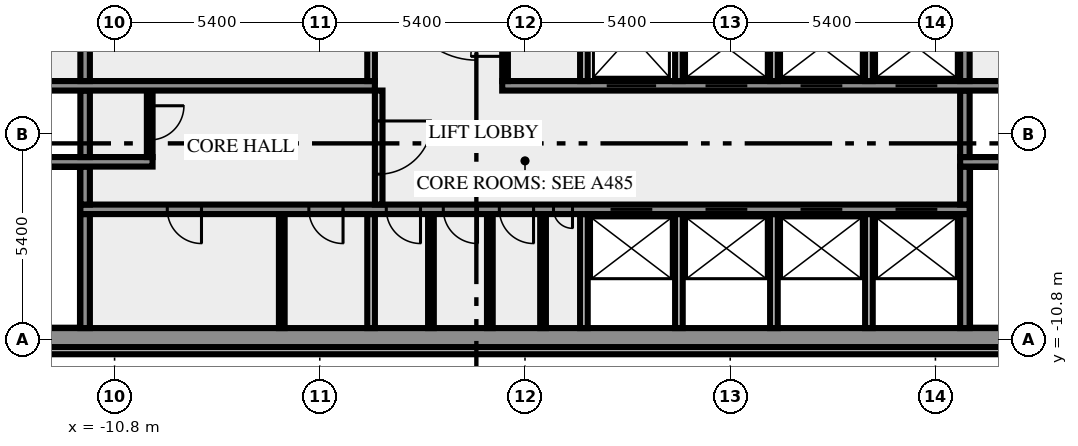
"""IFC4 building model, lengths in metres.
Left out: names, types, materials, properties, quantities, classifications, styles, units other than length and angle.
Written with IfcOpenShell. Run it as: python <this file> out.ifc"""

import sys

from ifc_helpers import new_model, si_unit, direction, frame, frame_2d, origin, place, context, subcontext, project, spatial, rectangle, extrude, element, fill, save


model = new_model("IFC4")
c1 = context("Model", 3, precision=1e-05, world=origin(), true_north=direction((0.0, 1.0)))
c2 = subcontext(c1, "Body", "Model", "MODEL_VIEW")
j1 = project(units=[si_unit("LENGTHUNIT", "METRE"), si_unit("PLANEANGLEUNIT", "RADIAN")], contexts=[c1])
p1 = place(None, origin())
s1 = spatial("IfcSite", under=j1, at=p1, CompositionType="ELEMENT")
p2 = place(p1, origin())
s2 = spatial("IfcBuilding", under=s1, at=p2, CompositionType="ELEMENT")
p3 = place(p2, frame((0.0, 0.0, 172.0)))
s3 = spatial("IfcBuildingStorey", under=s2, at=p3, CompositionType="ELEMENT", Elevation=172.0)
p4 = place(p3, frame((-17.444, -11.088, 0.0), z_axis=(0.0, 0.0, 1.0), x_axis=(1.0, 0.0, 0.0)))
e1 = element("IfcWall", 1, at=p4, inside=s3, PredefinedType="SOLIDWALL", context=c2, shape_type="SweptSolid", body=[
    extrude(rectangle(XDim=34.888, YDim=0.2, at=frame_2d((17.444, 0.0))), origin(), (0.0, 0.0, 1.0), 3.65),
])
p5 = place(p3, frame((-20.0, -10.75, 0.0), z_axis=(0.0, 0.0, 1.0), x_axis=(1.0, 0.0, 0.0)))
e2 = element("IfcWall", 2, at=p5, inside=s3, PredefinedType="SHEAR", context=c2, shape_type="SweptSolid", body=[
    extrude(rectangle(XDim=40.0, YDim=0.5, at=frame_2d((20.0, 0.0))), origin(), (0.0, 0.0, 1.0), 3.65),
])
p6 = place(p5, frame((0.8, 0.0, 1.0)))
e3 = element("IfcOpeningElement", 3, at=p6, cuts=e2, PredefinedType="OPENING", context=c2, shape_type="SweptSolid", body=[
    extrude(rectangle(XDim=1.2, YDim=1.2, at=frame_2d((0.6, 0.6))), frame((0.0, 0.26, 0.0), z_axis=(0.0, -1.0, 0.0), x_axis=(1.0, 0.0, 0.0)), (0.0, 0.0, 1.0), 0.52),
])
p7 = place(p5, frame((38.0, 0.0, 1.0)))
e4 = element("IfcOpeningElement", 4, at=p7, cuts=e2, PredefinedType="OPENING", context=c2, shape_type="SweptSolid", body=[
    extrude(rectangle(XDim=1.2, YDim=1.2, at=frame_2d((0.6, 0.6))), frame((0.0, 0.26, 0.0), z_axis=(0.0, -1.0, 0.0), x_axis=(1.0, 0.0, 0.0)), (0.0, 0.0, 1.0), 0.52),
])
p8 = place(p3, frame((-11.575, -10.5, 0.0), z_axis=(0.0, 0.0, 1.0), x_axis=(0.0, 1.0, 0.0)))
e5 = element("IfcWall", 5, at=p8, inside=s3, PredefinedType="SHEAR", context=c2, shape_type="SweptSolid", body=[
    extrude(rectangle(XDim=3.0, YDim=0.25, at=frame_2d((1.5, 0.0))), origin(), (0.0, 0.0, 1.0), 3.65),
])
p9 = place(p3, frame((-6.4, -10.5, 0.0), z_axis=(0.0, 0.0, 1.0), x_axis=(0.0, 1.0, 0.0)))
e6 = element("IfcWall", 6, at=p9, inside=s3, PredefinedType="PARTITIONING", context=c2, shape_type="SweptSolid", body=[
    extrude(rectangle(XDim=3.0, YDim=0.15, at=frame_2d((1.5, 0.0))), origin(), (0.0, 0.0, 1.0), 3.65),
])
p10 = place(p3, frame((-4.05, -10.5, 0.0), z_axis=(0.0, 0.0, 1.0), x_axis=(0.0, 1.0, 0.0)))
e7 = element("IfcWall", 7, at=p10, inside=s3, PredefinedType="SOLIDWALL", context=c2, shape_type="SweptSolid", body=[
    extrude(rectangle(XDim=3.0, YDim=0.2, at=frame_2d((1.5, 0.0))), origin(), (0.0, 0.0, 1.0), 3.65),
])
for number, where, z_axis, x_axis in (
    (8, (-2.475, -10.5, 0.0), (0.0, 0.0, 1.0), (0.0, 1.0, 0.0)),
    (9, (-0.925, -10.5, 0.0), (0.0, 0.0, 1.0), (0.0, 1.0, 0.0)),
    (10, (0.475, -10.5, 0.0), (0.0, 0.0, 1.0), (0.0, 1.0, 0.0)),
):
    element("IfcWall", number, at=place(p3, frame(where, z_axis=z_axis, x_axis=x_axis)), inside=s3, PredefinedType="PARTITIONING", context=c2, shape_type="SweptSolid", body=[
        extrude(rectangle(XDim=3.0, YDim=0.15, at=frame_2d((1.5, 0.0))), origin(), (0.0, 0.0, 1.0), 3.65),
    ])
for number, where, z_axis, x_axis in (
    (11, (1.55, -10.5, 0.0), (0.0, 0.0, 1.0), (0.0, 1.0, 0.0)),
    (12, (4.05, -10.5, 0.0), (0.0, 0.0, 1.0), (0.0, 1.0, 0.0)),
    (13, (6.55, -10.5, 0.0), (0.0, 0.0, 1.0), (0.0, 1.0, 0.0)),
    (14, (9.05, -10.5, 0.0), (0.0, 0.0, 1.0), (0.0, 1.0, 0.0)),
):
    element("IfcWall", number, at=place(p3, frame(where, z_axis=z_axis, x_axis=x_axis)), inside=s3, PredefinedType="SOLIDWALL", context=c2, shape_type="SweptSolid", body=[
        extrude(rectangle(XDim=3.0, YDim=0.2, at=frame_2d((1.5, 0.0))), origin(), (0.0, 0.0, 1.0), 3.65),
    ])
p11 = place(p3, frame((11.575, -10.5, 0.0), z_axis=(0.0, 0.0, 1.0), x_axis=(0.0, 1.0, 0.0)))
e15 = element("IfcWall", 15, at=p11, inside=s3, PredefinedType="SHEAR", context=c2, shape_type="SweptSolid", body=[
    extrude(rectangle(XDim=3.0, YDim=0.25, at=frame_2d((1.5, 0.0))), origin(), (0.0, 0.0, 1.0), 3.65),
])
p12 = place(p3, frame((11.7, -7.375, 0.0), z_axis=(0.0, 0.0, 1.0), x_axis=(-1.0, 0.0, 0.0)))
e16 = element("IfcWall", 16, at=p12, inside=s3, PredefinedType="SHEAR", context=c2, shape_type="SweptSolid", body=[
    extrude(rectangle(XDim=23.4, YDim=0.25, at=frame_2d((11.7, 0.0))), origin(), (0.0, 0.0, 1.0), 3.65),
])
p13 = place(p12, frame((20.213, 0.0, 0.0)))
e17 = element("IfcOpeningElement", 17, at=p13, cuts=e16, PredefinedType="OPENING", context=c2, shape_type="SweptSolid", body=[
    extrude(rectangle(XDim=0.9, YDim=2.1, at=frame_2d((0.45, 1.05))), frame((0.0, 0.135, 0.0), z_axis=(0.0, -1.0, 0.0), x_axis=(1.0, 0.0, 0.0)), (0.0, 0.0, 1.0), 0.27),
])
p14 = place(p12, frame((16.488, 0.0, 0.0)))
e18 = element("IfcOpeningElement", 18, at=p14, cuts=e16, PredefinedType="OPENING", context=c2, shape_type="SweptSolid", body=[
    extrude(rectangle(XDim=0.9, YDim=2.1, at=frame_2d((0.45, 1.05))), frame((0.0, 0.135, 0.0), z_axis=(0.0, -1.0, 0.0), x_axis=(1.0, 0.0, 0.0)), (0.0, 0.0, 1.0), 0.27),
])
p15 = place(p12, frame((14.45, 0.0, 0.0)))
e19 = element("IfcOpeningElement", 19, at=p15, cuts=e16, PredefinedType="OPENING", context=c2, shape_type="SweptSolid", body=[
    extrude(rectangle(XDim=0.9, YDim=2.1, at=frame_2d((0.45, 1.05))), frame((0.0, 0.135, 0.0), z_axis=(0.0, -1.0, 0.0), x_axis=(1.0, 0.0, 0.0)), (0.0, 0.0, 1.0), 0.27),
])
p16 = place(p12, frame((12.95, 0.0, 0.0)))
e20 = element("IfcOpeningElement", 20, at=p16, cuts=e16, PredefinedType="OPENING", context=c2, shape_type="SweptSolid", body=[
    extrude(rectangle(XDim=0.9, YDim=2.1, at=frame_2d((0.45, 1.05))), frame((0.0, 0.135, 0.0), z_axis=(0.0, -1.0, 0.0), x_axis=(1.0, 0.0, 0.0)), (0.0, 0.0, 1.0), 0.27),
])
p17 = place(p12, frame((11.475, 0.0, 0.0)))
e21 = element("IfcOpeningElement", 21, at=p17, cuts=e16, PredefinedType="OPENING", context=c2, shape_type="SweptSolid", body=[
    extrude(rectangle(XDim=0.9, YDim=2.1, at=frame_2d((0.45, 1.05))), frame((0.0, 0.135, 0.0), z_axis=(0.0, -1.0, 0.0), x_axis=(1.0, 0.0, 0.0)), (0.0, 0.0, 1.0), 0.27),
])
p18 = place(p12, frame((10.45, 0.0, 0.0)))
e22 = element("IfcOpeningElement", 22, at=p18, cuts=e16, PredefinedType="OPENING", context=c2, shape_type="SweptSolid", body=[
    extrude(rectangle(XDim=0.5, YDim=2.1, at=frame_2d((0.25, 1.05))), frame((0.0, 0.135, 0.0), z_axis=(0.0, -1.0, 0.0), x_axis=(1.0, 0.0, 0.0)), (0.0, 0.0, 1.0), 0.27),
])
p19 = place(p12, frame((8.35, 0.0, 0.0)))
e23 = element("IfcOpeningElement", 23, at=p19, cuts=e16, PredefinedType="OPENING", context=c2, shape_type="SweptSolid", body=[
    extrude(rectangle(XDim=1.1, YDim=2.1, at=frame_2d((0.55, 1.05))), frame((0.0, 0.135, 0.0), z_axis=(0.0, -1.0, 0.0), x_axis=(1.0, 0.0, 0.0)), (0.0, 0.0, 1.0), 0.27),
])
p20 = place(p12, frame((5.85, 0.0, 0.0)))
e24 = element("IfcOpeningElement", 24, at=p20, cuts=e16, PredefinedType="OPENING", context=c2, shape_type="SweptSolid", body=[
    extrude(rectangle(XDim=1.1, YDim=2.1, at=frame_2d((0.55, 1.05))), frame((0.0, 0.135, 0.0), z_axis=(0.0, -1.0, 0.0), x_axis=(1.0, 0.0, 0.0)), (0.0, 0.0, 1.0), 0.27),
])
p21 = place(p12, frame((3.35, 0.0, 0.0)))
e25 = element("IfcOpeningElement", 25, at=p21, cuts=e16, PredefinedType="OPENING", context=c2, shape_type="SweptSolid", body=[
    extrude(rectangle(XDim=1.1, YDim=2.1, at=frame_2d((0.55, 1.05))), frame((0.0, 0.135, 0.0), z_axis=(0.0, -1.0, 0.0), x_axis=(1.0, 0.0, 0.0)), (0.0, 0.0, 1.0), 0.27),
])
p22 = place(p12, frame((0.85, 0.0, 0.0)))
e26 = element("IfcOpeningElement", 26, at=p22, cuts=e16, PredefinedType="OPENING", context=c2, shape_type="SweptSolid", body=[
    extrude(rectangle(XDim=1.1, YDim=2.1, at=frame_2d((0.55, 1.05))), frame((0.0, 0.135, 0.0), z_axis=(0.0, -1.0, 0.0), x_axis=(1.0, 0.0, 0.0)), (0.0, 0.0, 1.0), 0.27),
])
p23 = place(p3, frame((-11.575, -7.25, 0.0), z_axis=(0.0, 0.0, 1.0), x_axis=(0.0, 1.0, 0.0)))
e27 = element("IfcWall", 27, at=p23, inside=s3, PredefinedType="SHEAR", context=c2, shape_type="SweptSolid", body=[
    extrude(rectangle(XDim=1.0, YDim=0.25, at=frame_2d((0.5, 0.0))), origin(), (0.0, 0.0, 1.0), 3.65),
])
p24 = place(p3, frame((-3.85, -4.25, 0.0), z_axis=(0.0, 0.0, 1.0), x_axis=(0.0, -1.0, 0.0)))
e28 = element("IfcWall", 28, at=p24, inside=s3, PredefinedType="SOLIDWALL", context=c2, shape_type="SweptSolid", body=[
    extrude(rectangle(XDim=3.0, YDim=0.2, at=frame_2d((1.5, 0.0))), origin(), (0.0, 0.0, 1.0), 3.65),
])
p25 = place(p24, frame((0.8, 0.0, 0.0)))
e29 = element("IfcOpeningElement", 29, at=p25, cuts=e28, PredefinedType="OPENING", context=c2, shape_type="SweptSolid", body=[
    extrude(rectangle(XDim=1.4, YDim=2.1, at=frame_2d((0.7, 1.05))), frame((0.0, 0.11, 0.0), z_axis=(0.0, -1.0, 0.0), x_axis=(1.0, 0.0, 0.0)), (0.0, 0.0, 1.0), 0.22),
])
p26 = place(p3, frame((11.575, -7.25, 0.0), z_axis=(0.0, 0.0, 1.0), x_axis=(0.0, 1.0, 0.0)))
e30 = element("IfcWall", 30, at=p26, inside=s3, PredefinedType="SHEAR", context=c2, shape_type="SweptSolid", body=[
    extrude(rectangle(XDim=1.0, YDim=0.25, at=frame_2d((0.5, 0.0))), origin(), (0.0, 0.0, 1.0), 3.65),
])
p27 = place(p3, frame((-9.8, -6.125, 0.0), z_axis=(0.0, 0.0, 1.0), x_axis=(-1.0, 0.0, 0.0)))
e31 = element("IfcWall", 31, at=p27, inside=s3, PredefinedType="SHEAR", context=c2, shape_type="SweptSolid", body=[
    extrude(rectangle(XDim=10.2, YDim=0.25, at=frame_2d((5.1, 0.0))), origin(), (0.0, 0.0, 1.0), 3.65),
])
p28 = place(p27, frame((7.85, 0.0, 0.0)))
e32 = element("IfcOpeningElement", 32, at=p28, cuts=e31, PredefinedType="OPENING", context=c2, shape_type="SweptSolid", body=[
    extrude(rectangle(XDim=1.8, YDim=2.1, at=frame_2d((0.9, 1.05))), frame((0.0, 0.135, 0.0), z_axis=(0.0, -1.0, 0.0), x_axis=(1.0, 0.0, 0.0)), (0.0, 0.0, 1.0), 0.27),
])
p29 = place(p3, frame((19.5, -6.125, 0.0), z_axis=(0.0, 0.0, 1.0), x_axis=(-1.0, 0.0, 0.0)))
e33 = element("IfcWall", 33, at=p29, inside=s3, PredefinedType="SHEAR", context=c2, shape_type="SweptSolid", body=[
    extrude(rectangle(XDim=8.05, YDim=0.25, at=frame_2d((4.025, 0.0))), origin(), (0.0, 0.0, 1.0), 3.65),
])
p30 = place(p29, frame((0.05, 0.0, 0.0)))
e34 = element("IfcOpeningElement", 34, at=p30, cuts=e33, PredefinedType="OPENING", context=c2, shape_type="SweptSolid", body=[
    extrude(rectangle(XDim=1.8, YDim=2.1, at=frame_2d((0.9, 1.05))), frame((0.0, 0.135, 0.0), z_axis=(0.0, -1.0, 0.0), x_axis=(1.0, 0.0, 0.0)), (0.0, 0.0, 1.0), 0.27),
])
p31 = place(p3, frame((-11.575, -6.0, 0.0), z_axis=(0.0, 0.0, 1.0), x_axis=(0.0, 1.0, 0.0)))
e35 = element("IfcWall", 35, at=p31, inside=s3, PredefinedType="SHEAR", context=c2, shape_type="SweptSolid", body=[
    extrude(rectangle(XDim=1.75, YDim=0.25, at=frame_2d((0.875, 0.0))), origin(), (0.0, 0.0, 1.0), 3.65),
])
p32 = place(p3, frame((-9.875, -4.25, 0.0), z_axis=(0.0, 0.0, 1.0), x_axis=(0.0, -1.0, 0.0)))
e36 = element("IfcWall", 36, at=p32, inside=s3, PredefinedType="PARTITIONING", context=c2, shape_type="SweptSolid", body=[
    extrude(rectangle(XDim=1.75, YDim=0.15, at=frame_2d((0.875, 0.0))), origin(), (0.0, 0.0, 1.0), 3.65),
])
p33 = place(p32, frame((0.4, 0.0, 0.0)))
e37 = element("IfcOpeningElement", 37, at=p33, cuts=e36, PredefinedType="OPENING", context=c2, shape_type="SweptSolid", body=[
    extrude(rectangle(XDim=0.9, YDim=2.1, at=frame_2d((0.45, 1.05))), frame((0.0, 0.085, 0.0), z_axis=(0.0, -1.0, 0.0), x_axis=(1.0, 0.0, 0.0)), (0.0, 0.0, 1.0), 0.17),
])
p34 = place(p3, frame((11.575, -6.0, 0.0), z_axis=(0.0, 0.0, 1.0), x_axis=(0.0, 1.0, 0.0)))
e38 = element("IfcWall", 38, at=p34, inside=s3, PredefinedType="SHEAR", context=c2, shape_type="SweptSolid", body=[
    extrude(rectangle(XDim=1.75, YDim=0.25, at=frame_2d((0.875, 0.0))), origin(), (0.0, 0.0, 1.0), 3.65),
])
p35 = place(p3, frame((-14.35, -4.125, 0.0), z_axis=(0.0, 0.0, 1.0), x_axis=(1.0, 0.0, 0.0)))
e39 = element("IfcWall", 39, at=p35, inside=s3, PredefinedType="SHEAR", context=c2, shape_type="SweptSolid", body=[
    extrude(rectangle(XDim=10.4, YDim=0.25, at=frame_2d((5.2, 0.0))), origin(), (0.0, 0.0, 1.0), 3.65),
])
p36 = place(p3, frame((-0.6, -4.125, 0.0), z_axis=(0.0, 0.0, 1.0), x_axis=(1.0, 0.0, 0.0)))
e40 = element("IfcWall", 40, at=p36, inside=s3, PredefinedType="SHEAR", context=c2, shape_type="SweptSolid", body=[
    extrude(rectangle(XDim=14.95, YDim=0.25, at=frame_2d((7.475, 0.0))), origin(), (0.0, 0.0, 1.0), 3.65),
])
p37 = place(p36, frame((2.75, 0.0, 0.0)))
e41 = element("IfcOpeningElement", 41, at=p37, cuts=e40, PredefinedType="OPENING", context=c2, shape_type="SweptSolid", body=[
    extrude(rectangle(XDim=1.3, YDim=2.1, at=frame_2d((0.65, 1.05))), frame((0.0, 0.135, 0.0), z_axis=(0.0, -1.0, 0.0), x_axis=(1.0, 0.0, 0.0)), (0.0, 0.0, 1.0), 0.27),
])
p38 = place(p36, frame((5.35, 0.0, 0.0)))
e42 = element("IfcOpeningElement", 42, at=p38, cuts=e40, PredefinedType="OPENING", context=c2, shape_type="SweptSolid", body=[
    extrude(rectangle(XDim=1.1, YDim=2.1, at=frame_2d((0.55, 1.05))), frame((0.0, 0.135, 0.0), z_axis=(0.0, -1.0, 0.0), x_axis=(1.0, 0.0, 0.0)), (0.0, 0.0, 1.0), 0.27),
])
p39 = place(p36, frame((7.85, 0.0, 0.0)))
e43 = element("IfcOpeningElement", 43, at=p39, cuts=e40, PredefinedType="OPENING", context=c2, shape_type="SweptSolid", body=[
    extrude(rectangle(XDim=1.1, YDim=2.1, at=frame_2d((0.55, 1.05))), frame((0.0, 0.135, 0.0), z_axis=(0.0, -1.0, 0.0), x_axis=(1.0, 0.0, 0.0)), (0.0, 0.0, 1.0), 0.27),
])
p40 = place(p36, frame((10.35, 0.0, 0.0)))
e44 = element("IfcOpeningElement", 44, at=p40, cuts=e40, PredefinedType="OPENING", context=c2, shape_type="SweptSolid", body=[
    extrude(rectangle(XDim=1.1, YDim=2.1, at=frame_2d((0.55, 1.05))), frame((0.0, 0.135, 0.0), z_axis=(0.0, -1.0, 0.0), x_axis=(1.0, 0.0, 0.0)), (0.0, 0.0, 1.0), 0.27),
])
p41 = place(p3, frame((-11.575, -4.0, 0.0), z_axis=(0.0, 0.0, 1.0), x_axis=(0.0, 1.0, 0.0)))
e45 = element("IfcWall", 45, at=p41, inside=s3, PredefinedType="SHEAR", context=c2, shape_type="SweptSolid", body=[
    extrude(rectangle(XDim=2.3, YDim=0.25, at=frame_2d((1.15, 0.0))), origin(), (0.0, 0.0, 1.0), 3.65),
])
p42 = place(p3, frame((-4.05, -4.0, 0.0), z_axis=(0.0, 0.0, 1.0), x_axis=(0.0, 1.0, 0.0)))
e46 = element("IfcWall", 46, at=p42, inside=s3, PredefinedType="SOLIDWALL", context=c2, shape_type="SweptSolid", body=[
    extrude(rectangle(XDim=2.3, YDim=0.2, at=frame_2d((1.15, 0.0))), origin(), (0.0, 0.0, 1.0), 3.65),
])
p43 = place(p3, frame((-0.525, -4.0, 0.0), z_axis=(0.0, 0.0, 1.0), x_axis=(0.0, 1.0, 0.0)))
e47 = element("IfcWall", 47, at=p43, inside=s3, PredefinedType="PARTITIONING", context=c2, shape_type="SweptSolid", body=[
    extrude(rectangle(XDim=2.3, YDim=0.15, at=frame_2d((1.15, 0.0))), origin(), (0.0, 0.0, 1.0), 3.65),
])
p44 = place(p43, frame((0.65, 0.0, 0.0)))
e48 = element("IfcOpeningElement", 48, at=p44, cuts=e47, PredefinedType="OPENING", context=c2, shape_type="SweptSolid", body=[
    extrude(rectangle(XDim=0.9, YDim=2.1, at=frame_2d((0.45, 1.05))), frame((0.0, 0.085, 0.0), z_axis=(0.0, -1.0, 0.0), x_axis=(1.0, 0.0, 0.0)), (0.0, 0.0, 1.0), 0.17),
])
for number, where, z_axis, x_axis in (
    (49, (1.55, -4.0, 0.0), (0.0, 0.0, 1.0), (0.0, 1.0, 0.0)),
    (50, (4.05, -4.0, 0.0), (0.0, 0.0, 1.0), (0.0, 1.0, 0.0)),
    (51, (6.55, -4.0, 0.0), (0.0, 0.0, 1.0), (0.0, 1.0, 0.0)),
    (52, (9.05, -4.0, 0.0), (0.0, 0.0, 1.0), (0.0, 1.0, 0.0)),
):
    element("IfcWall", number, at=place(p3, frame(where, z_axis=z_axis, x_axis=x_axis)), inside=s3, PredefinedType="SOLIDWALL", context=c2, shape_type="SweptSolid", body=[
        extrude(rectangle(XDim=2.3, YDim=0.2, at=frame_2d((1.15, 0.0))), origin(), (0.0, 0.0, 1.0), 3.65),
    ])
p45 = place(p3, frame((11.575, -4.0, 0.0), z_axis=(0.0, 0.0, 1.0), x_axis=(0.0, 1.0, 0.0)))
e53 = element("IfcWall", 53, at=p45, inside=s3, PredefinedType="SHEAR", context=c2, shape_type="SweptSolid", body=[
    extrude(rectangle(XDim=2.3, YDim=0.25, at=frame_2d((1.15, 0.0))), origin(), (0.0, 0.0, 1.0), 3.65),
])
p46 = place(p13, origin())
e54 = element("IfcDoor", 54, at=p46, inside=s3, OperationType="SINGLE_SWING_RIGHT", PredefinedType="DOOR", context=c2, shape_type="SweptSolid", body=[
    extrude(rectangle(XDim=0.9, YDim=2.1, at=frame_2d((0.45, 1.05))), frame((0.0, 0.025, 0.0), z_axis=(0.0, -1.0, 0.0), x_axis=(1.0, 0.0, 0.0)), (0.0, 0.0, 1.0), 0.05),
])
fill(e17, e54)
p47 = place(p14, origin())
e55 = element("IfcDoor", 55, at=p47, inside=s3, OperationType="SINGLE_SWING_RIGHT", PredefinedType="DOOR", context=c2, shape_type="SweptSolid", body=[
    extrude(rectangle(XDim=0.9, YDim=2.1, at=frame_2d((0.45, 1.05))), frame((0.0, 0.025, 0.0), z_axis=(0.0, -1.0, 0.0), x_axis=(1.0, 0.0, 0.0)), (0.0, 0.0, 1.0), 0.05),
])
fill(e18, e55)
p48 = place(p15, origin())
e56 = element("IfcDoor", 56, at=p48, inside=s3, OperationType="SINGLE_SWING_RIGHT", PredefinedType="DOOR", context=c2, shape_type="SweptSolid", body=[
    extrude(rectangle(XDim=0.9, YDim=2.1, at=frame_2d((0.45, 1.05))), frame((0.0, 0.025, 0.0), z_axis=(0.0, -1.0, 0.0), x_axis=(1.0, 0.0, 0.0)), (0.0, 0.0, 1.0), 0.05),
])
fill(e19, e56)
p49 = place(p16, origin())
e57 = element("IfcDoor", 57, at=p49, inside=s3, OperationType="SINGLE_SWING_RIGHT", PredefinedType="DOOR", context=c2, shape_type="SweptSolid", body=[
    extrude(rectangle(XDim=0.9, YDim=2.1, at=frame_2d((0.45, 1.05))), frame((0.0, 0.025, 0.0), z_axis=(0.0, -1.0, 0.0), x_axis=(1.0, 0.0, 0.0)), (0.0, 0.0, 1.0), 0.05),
])
fill(e20, e57)
p50 = place(p17, origin())
e58 = element("IfcDoor", 58, at=p50, inside=s3, OperationType="SINGLE_SWING_RIGHT", PredefinedType="DOOR", context=c2, shape_type="SweptSolid", body=[
    extrude(rectangle(XDim=0.9, YDim=2.1, at=frame_2d((0.45, 1.05))), frame((0.0, 0.025, 0.0), z_axis=(0.0, -1.0, 0.0), x_axis=(1.0, 0.0, 0.0)), (0.0, 0.0, 1.0), 0.05),
])
fill(e21, e58)
p51 = place(p18, origin())
e59 = element("IfcDoor", 59, at=p51, inside=s3, OperationType="SINGLE_SWING_LEFT", PredefinedType="DOOR", context=c2, shape_type="SweptSolid", body=[
    extrude(rectangle(XDim=0.5, YDim=2.1, at=frame_2d((0.25, 1.05))), frame((0.0, 0.025, 0.0), z_axis=(0.0, -1.0, 0.0), x_axis=(1.0, 0.0, 0.0)), (0.0, 0.0, 1.0), 0.05),
])
fill(e22, e59)
p52 = place(p19, origin())
e60 = element("IfcDoor", 60, at=p52, inside=s3, OperationType="DOUBLE_DOOR_SLIDING", PredefinedType="DOOR", context=c2, shape_type="SweptSolid", body=[
    extrude(rectangle(XDim=1.1, YDim=2.1, at=frame_2d((0.55, 1.05))), frame((0.0, 0.025, 0.0), z_axis=(0.0, -1.0, 0.0), x_axis=(1.0, 0.0, 0.0)), (0.0, 0.0, 1.0), 0.05),
])
fill(e23, e60)
p53 = place(p20, origin())
e61 = element("IfcDoor", 61, at=p53, inside=s3, OperationType="DOUBLE_DOOR_SLIDING", PredefinedType="DOOR", context=c2, shape_type="SweptSolid", body=[
    extrude(rectangle(XDim=1.1, YDim=2.1, at=frame_2d((0.55, 1.05))), frame((0.0, 0.025, 0.0), z_axis=(0.0, -1.0, 0.0), x_axis=(1.0, 0.0, 0.0)), (0.0, 0.0, 1.0), 0.05),
])
fill(e24, e61)
p54 = place(p21, origin())
e62 = element("IfcDoor", 62, at=p54, inside=s3, OperationType="DOUBLE_DOOR_SLIDING", PredefinedType="DOOR", context=c2, shape_type="SweptSolid", body=[
    extrude(rectangle(XDim=1.1, YDim=2.1, at=frame_2d((0.55, 1.05))), frame((0.0, 0.025, 0.0), z_axis=(0.0, -1.0, 0.0), x_axis=(1.0, 0.0, 0.0)), (0.0, 0.0, 1.0), 0.05),
])
fill(e25, e62)
p55 = place(p22, origin())
e63 = element("IfcDoor", 63, at=p55, inside=s3, OperationType="DOUBLE_DOOR_SLIDING", PredefinedType="DOOR", context=c2, shape_type="SweptSolid", body=[
    extrude(rectangle(XDim=1.1, YDim=2.1, at=frame_2d((0.55, 1.05))), frame((0.0, 0.025, 0.0), z_axis=(0.0, -1.0, 0.0), x_axis=(1.0, 0.0, 0.0)), (0.0, 0.0, 1.0), 0.05),
])
fill(e26, e63)
p56 = place(p25, origin())
e64 = element("IfcDoor", 64, at=p56, inside=s3, OperationType="DOUBLE_DOOR_SINGLE_SWING", PredefinedType="DOOR", context=c2, shape_type="SweptSolid", body=[
    extrude(rectangle(XDim=1.4, YDim=2.1, at=frame_2d((0.7, 1.05))), frame((0.0, 0.025, 0.0), z_axis=(0.0, -1.0, 0.0), x_axis=(1.0, 0.0, 0.0)), (0.0, 0.0, 1.0), 0.05),
])
fill(e29, e64)
p57 = place(p33, origin())
e65 = element("IfcDoor", 65, at=p57, inside=s3, OperationType="SINGLE_SWING_LEFT", PredefinedType="DOOR", context=c2, shape_type="SweptSolid", body=[
    extrude(rectangle(XDim=0.9, YDim=2.1, at=frame_2d((0.45, 1.05))), frame((0.0, 0.025, 0.0), z_axis=(0.0, -1.0, 0.0), x_axis=(1.0, 0.0, 0.0)), (0.0, 0.0, 1.0), 0.05),
])
fill(e37, e65)
p58 = place(p37, origin())
e66 = element("IfcDoor", 66, at=p58, inside=s3, OperationType="DOUBLE_DOOR_SLIDING", PredefinedType="DOOR", context=c2, shape_type="SweptSolid", body=[
    extrude(rectangle(XDim=1.3, YDim=2.1, at=frame_2d((0.65, 1.05))), frame((0.0, 0.025, 0.0), z_axis=(0.0, -1.0, 0.0), x_axis=(1.0, 0.0, 0.0)), (0.0, 0.0, 1.0), 0.05),
])
fill(e41, e66)
p59 = place(p38, origin())
e67 = element("IfcDoor", 67, at=p59, inside=s3, OperationType="DOUBLE_DOOR_SLIDING", PredefinedType="DOOR", context=c2, shape_type="SweptSolid", body=[
    extrude(rectangle(XDim=1.1, YDim=2.1, at=frame_2d((0.55, 1.05))), frame((0.0, 0.025, 0.0), z_axis=(0.0, -1.0, 0.0), x_axis=(1.0, 0.0, 0.0)), (0.0, 0.0, 1.0), 0.05),
])
fill(e42, e67)
p60 = place(p39, origin())
e68 = element("IfcDoor", 68, at=p60, inside=s3, OperationType="DOUBLE_DOOR_SLIDING", PredefinedType="DOOR", context=c2, shape_type="SweptSolid", body=[
    extrude(rectangle(XDim=1.1, YDim=2.1, at=frame_2d((0.55, 1.05))), frame((0.0, 0.025, 0.0), z_axis=(0.0, -1.0, 0.0), x_axis=(1.0, 0.0, 0.0)), (0.0, 0.0, 1.0), 0.05),
])
fill(e43, e68)
p61 = place(p40, origin())
e69 = element("IfcDoor", 69, at=p61, inside=s3, OperationType="DOUBLE_DOOR_SLIDING", PredefinedType="DOOR", context=c2, shape_type="SweptSolid", body=[
    extrude(rectangle(XDim=1.1, YDim=2.1, at=frame_2d((0.55, 1.05))), frame((0.0, 0.025, 0.0), z_axis=(0.0, -1.0, 0.0), x_axis=(1.0, 0.0, 0.0)), (0.0, 0.0, 1.0), 0.05),
])
fill(e44, e69)
p62 = place(p44, origin())
e70 = element("IfcDoor", 70, at=p62, inside=s3, OperationType="SINGLE_SWING_LEFT", PredefinedType="DOOR", context=c2, shape_type="SweptSolid", body=[
    extrude(rectangle(XDim=0.9, YDim=2.1, at=frame_2d((0.45, 1.05))), frame((0.0, 0.025, 0.0), z_axis=(0.0, -1.0, 0.0), x_axis=(1.0, 0.0, 0.0)), (0.0, 0.0, 1.0), 0.05),
])
fill(e48, e70)
save(model, sys.argv[1])
